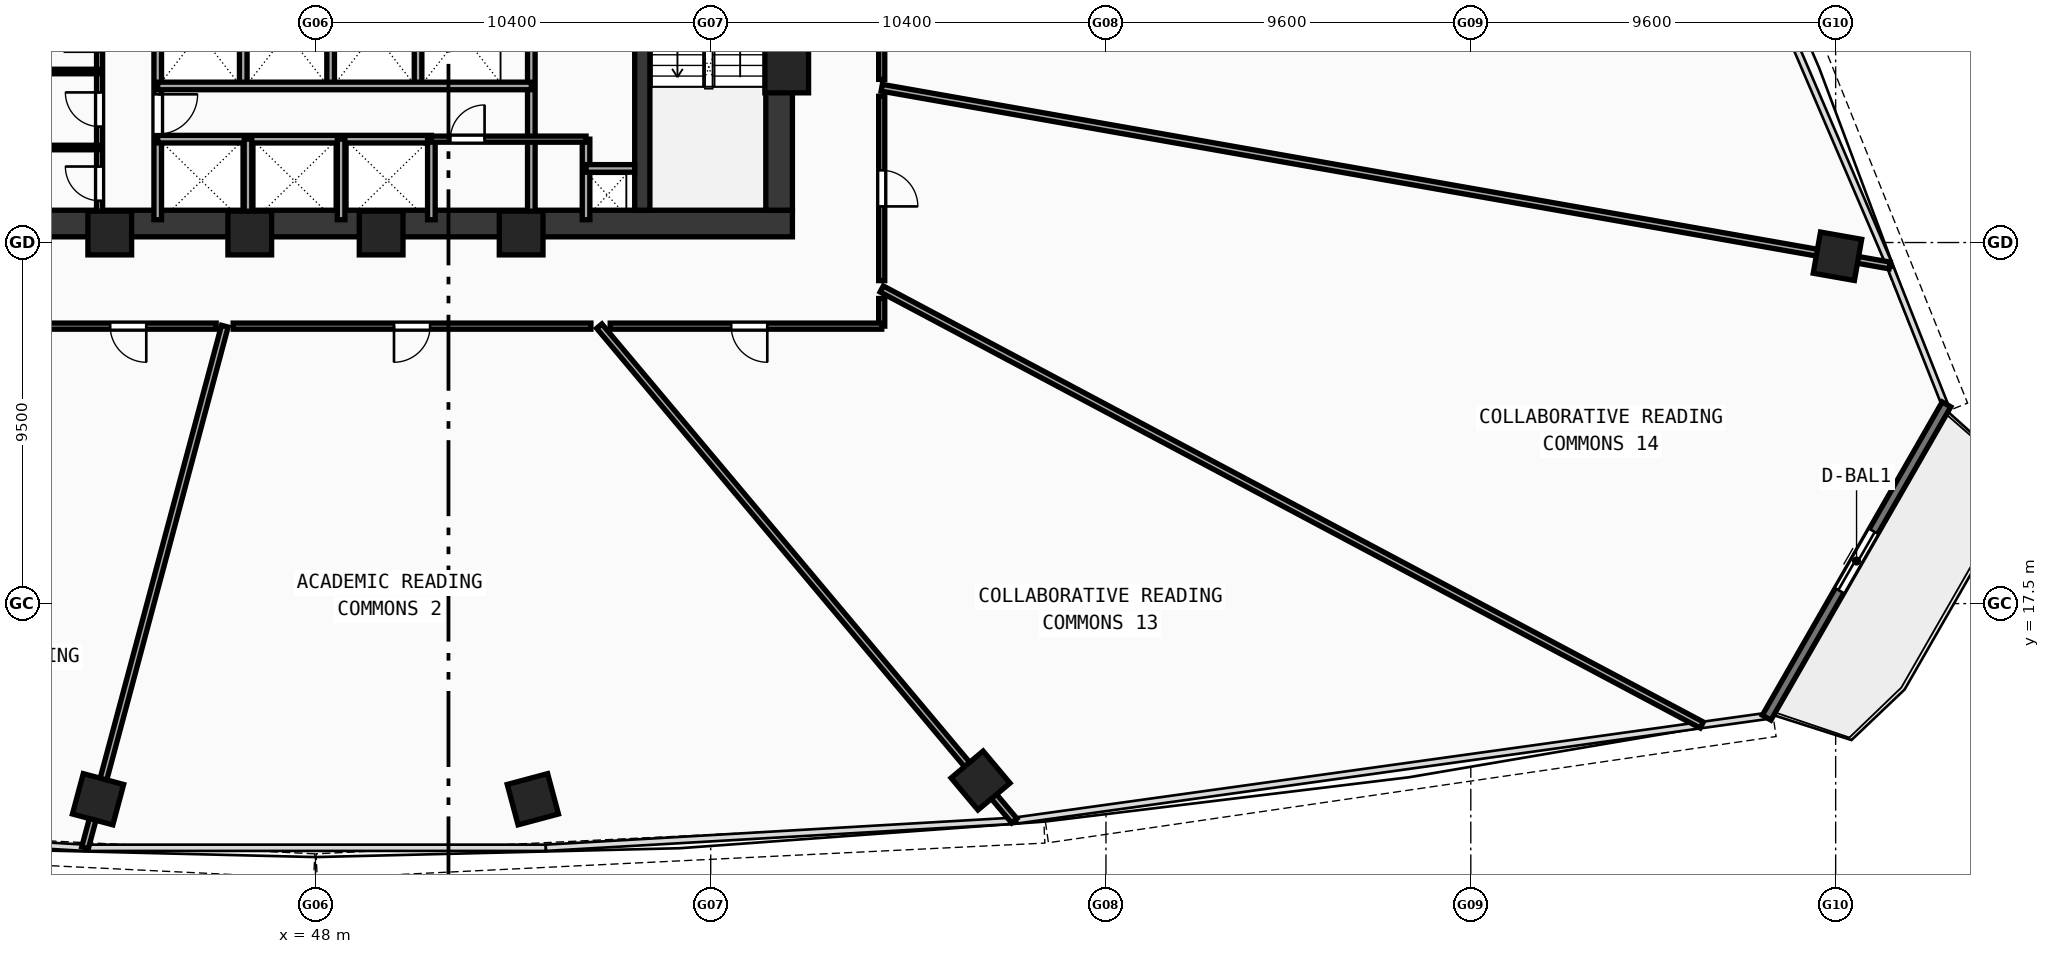
"""IFC4 building model, lengths in metres.
Left out: names, types, materials, properties, quantities, classifications, styles, units other than length and angle.
Written with IfcOpenShell. Run it as: python <this file> out.ifc"""

import sys

from ifc_helpers import new_model, si_unit, direction, frame, frame_2d, origin, origin_with_axes, origin_2d, place, context, subcontext, project, spatial, rectangle, hollow_rectangle, extrude, source, transform, mapped, element, fill, save


model = new_model("IFC4")
c1 = context("Model", 3, precision=1e-05, world=origin(), true_north=direction((0.0, 1.0)))
c2 = subcontext(c1, "Body", "Model", "MODEL_VIEW")
j1 = project(units=[si_unit("LENGTHUNIT", "METRE"), si_unit("PLANEANGLEUNIT", "RADIAN")], contexts=[c1])
p1 = place(None, origin())
s1 = spatial("IfcSite", under=j1, at=p1, CompositionType="ELEMENT")
p2 = place(p1, origin())
s2 = spatial("IfcBuilding", under=s1, at=p2, CompositionType="ELEMENT")
p3 = place(p2, frame((0.0, 0.0, 52.18)))
s3 = spatial("IfcBuildingStorey", under=s2, at=p3, CompositionType="ELEMENT", Elevation=52.18)
p4 = place(p3, frame((35.45, 27.5, 0.0), z_axis=(0.0, 0.0, 1.0), x_axis=(1.0, 0.0, 0.0)))
e1 = element("IfcWall", 1, at=p4, inside=s3, PredefinedType="SHEAR", context=c2, shape_type="SweptSolid", body=[
    extrude(rectangle(XDim=25.1, YDim=0.7, at=frame_2d((12.55, 0.0))), origin(), (0.0, 0.0, 1.0), 3.37),
])
p5 = place(p3, frame((60.2, 27.85, 0.0), z_axis=(0.0, 0.0, 1.0), x_axis=(0.0, 1.0, 0.0)))
e2 = element("IfcWall", 2, at=p5, inside=s3, PredefinedType="SHEAR", context=c2, shape_type="SweptSolid", body=[
    extrude(rectangle(XDim=12.0, YDim=0.7, at=frame_2d((6.0, 0.0))), origin(), (0.0, 0.0, 1.0), 3.37),
])
p6 = place(p3, frame((56.6, 27.85, 0.0), z_axis=(0.0, 0.0, 1.0), x_axis=(0.0, 1.0, 0.0)))
e3 = element("IfcWall", 3, at=p6, inside=s3, PredefinedType="SHEAR", context=c2, shape_type="SweptSolid", body=[
    extrude(rectangle(XDim=12.0, YDim=0.4, at=frame_2d((6.0, 0.0))), origin(), (0.0, 0.0, 1.0), 3.37),
])
p7 = place(p6, frame((9.9, 0.0, 0.0)))
e4 = element("IfcOpeningElement", 4, at=p7, cuts=e3, PredefinedType="OPENING", context=c2, shape_type="SweptSolid", body=[
    extrude(rectangle(XDim=1.1, YDim=2.1, at=frame_2d((0.55, 1.05))), frame((0.0, 0.21, 0.0), z_axis=(0.0, -1.0, 0.0), x_axis=(1.0, 0.0, 0.0)), (0.0, 0.0, 1.0), 0.42),
])
m1 = source(origin(), c2, "Body", "SweptSolid", [
    extrude(hollow_rectangle(XDim=1.15, YDim=1.15, WallThickness=0.048, at=origin_2d()), origin(), (0.0, 0.0, 1.0), 3.63),
])
for number, where, z_axis, x_axis in (
    (5, (42.588, 27.25, -0.26), (0.0, 0.0, 1.0), (1.0, 0.0, 0.0)),
    (6, (46.272, 27.25, -0.26), (0.0, 0.0, 1.0), (1.0, 0.0, 0.0)),
    (7, (49.729, 27.25, -0.26), (0.0, 0.0, 1.0), (1.0, 0.0, 0.0)),
    (8, (53.412, 27.25, -0.26), (0.0, 0.0, 1.0), (1.0, 0.0, 0.0)),
    (9, (60.4, 31.513, -0.26), (0.0, 0.0, 1.0), (1.0, 0.0, 0.0)),
):
    element("IfcColumn", number, at=place(p3, frame(where, z_axis=z_axis, x_axis=x_axis)), inside=s3, PredefinedType="COLUMN", context=c2, shape_type="MappedRepresentation", body=[
        mapped(m1, transform((0.0, 0.0, 0.0), scale=1.0)),
    ])
m2 = source(origin(), c2, "Body", "SweptSolid", [
    extrude(hollow_rectangle(XDim=1.1, YDim=1.1, WallThickness=0.045, at=origin_2d()), origin(), (0.0, 0.0, 1.0), 3.63),
])
for number, where, z_axis, x_axis in (
    (10, (42.28, 12.352, -0.26), (0.0, 0.0, 1.0), (0.966, -0.259, 0.0)),
    (11, (53.72, 12.352, -0.26), (0.0, 0.0, 1.0), (0.966, 0.259, 0.0)),
    (12, (65.5, 12.844, -0.26), (0.0, 0.0, 1.0), (0.766, 0.643, 0.0)),
    (13, (88.048, 26.638, -0.26), (0.0, 0.0, 1.0), (0.174, 0.985, 0.0)),
):
    element("IfcColumn", number, at=place(p3, frame(where, z_axis=z_axis, x_axis=x_axis)), inside=s3, PredefinedType="COLUMN", context=c2, shape_type="MappedRepresentation", body=[
        mapped(m2, transform((0.0, 0.0, 0.0), scale=1.0)),
    ])
p8 = place(p3, frame((86.184, 14.499, 0.0), z_axis=(0.0, 0.0, 1.0), x_axis=(0.497919395469, 0.86722331358, 0.0)))
e14 = element("IfcWall", 14, at=p8, inside=s3, PredefinedType="STANDARD", context=c2, shape_type="SweptSolid", body=[
    extrude(rectangle(XDim=9.504, YDim=0.26, at=frame_2d((4.752, 0.0))), origin(), (0.0, 0.0, 1.0), 3.37),
])
p9 = place(p8, frame((3.852, 0.0, 0.0)))
e15 = element("IfcOpeningElement", 15, at=p9, cuts=e14, PredefinedType="OPENING", context=c2, shape_type="SweptSolid", body=[
    extrude(rectangle(XDim=1.8, YDim=2.15, at=frame_2d((0.9, 1.075))), frame((0.0, 0.14, 0.0), z_axis=(0.0, -1.0, 0.0), x_axis=(1.0, 0.0, 0.0)), (0.0, 0.0, 1.0), 0.28),
])
p10 = place(p3, frame((43.85, 27.6, 0.0), z_axis=(0.0, 0.0, 1.0), x_axis=(0.0, 1.0, 0.0)))
e16 = element("IfcWall", 16, at=p10, inside=s3, PredefinedType="SOLIDWALL", context=c2, shape_type="SweptSolid", body=[
    extrude(rectangle(XDim=6.22, YDim=0.2, at=frame_2d((3.11, 0.0))), origin(), (0.0, 0.0, 1.0), 3.37),
])
p11 = place(p10, frame((2.25, 0.0, 0.0)))
e17 = element("IfcOpeningElement", 17, at=p11, cuts=e16, PredefinedType="OPENING", context=c2, shape_type="SweptSolid", body=[
    extrude(rectangle(XDim=1.05, YDim=2.1, at=frame_2d((0.525, 1.05))), frame((0.0, 0.11, 0.0), z_axis=(0.0, -1.0, 0.0), x_axis=(1.0, 0.0, 0.0)), (0.0, 0.0, 1.0), 0.22),
])
p12 = place(p3, frame((53.68, 27.6, 0.0), z_axis=(0.0, 0.0, 1.0), x_axis=(0.0, 1.0, 0.0)))
e18 = element("IfcWall", 18, at=p12, inside=s3, PredefinedType="SOLIDWALL", context=c2, shape_type="SweptSolid", body=[
    extrude(rectangle(XDim=9.05, YDim=0.2, at=frame_2d((4.525, 0.0))), origin(), (0.0, 0.0, 1.0), 3.37),
])
p13 = place(p12, frame((6.9, 0.0, 0.0)))
e19 = element("IfcOpeningElement", 19, at=p13, cuts=e18, PredefinedType="OPENING", context=c2, shape_type="SweptSolid", body=[
    extrude(rectangle(XDim=1.05, YDim=2.1, at=frame_2d((0.525, 1.05))), frame((0.0, 0.11, 0.0), z_axis=(0.0, -1.0, 0.0), x_axis=(1.0, 0.0, 0.0)), (0.0, 0.0, 1.0), 0.22),
])
for number, where, z_axis, x_axis in (
    (20, (46.1, 31.12, 0.0), (0.0, 0.0, 1.0), (0.0, 1.0, 0.0)),
    (21, (48.4, 31.12, 0.0), (0.0, 0.0, 1.0), (0.0, 1.0, 0.0)),
    (22, (50.7, 31.12, 0.0), (0.0, 0.0, 1.0), (0.0, 1.0, 0.0)),
):
    element("IfcWall", number, at=place(p3, frame(where, z_axis=z_axis, x_axis=x_axis)), inside=s3, PredefinedType="SOLIDWALL", context=c2, shape_type="SweptSolid", body=[
        extrude(rectangle(XDim=2.7, YDim=0.2, at=frame_2d((1.35, 0.0))), origin(), (0.0, 0.0, 1.0), 3.37),
    ])
p14 = place(p3, frame((43.85, 29.72, 0.0), z_axis=(0.0, 0.0, 1.0), x_axis=(1.0, 0.0, 0.0)))
e23 = element("IfcWall", 23, at=p14, inside=s3, PredefinedType="SOLIDWALL", context=c2, shape_type="SweptSolid", body=[
    extrude(rectangle(XDim=7.2, YDim=0.2, at=frame_2d((3.6, 0.0))), origin(), (0.0, 0.0, 1.0), 3.37),
])
p15 = place(p3, frame((51.05, 27.6, 0.0), z_axis=(0.0, 0.0, 1.0), x_axis=(0.0, 1.0, 0.0)))
e24 = element("IfcWall", 24, at=p15, inside=s3, PredefinedType="SOLIDWALL", context=c2, shape_type="SweptSolid", body=[
    extrude(rectangle(XDim=2.12, YDim=0.2, at=frame_2d((1.06, 0.0))), origin(), (0.0, 0.0, 1.0), 3.37),
])
p16 = place(p3, frame((43.85, 31.12, 0.0), z_axis=(0.0, 0.0, 1.0), x_axis=(1.0, 0.0, 0.0)))
e25 = element("IfcWall", 25, at=p16, inside=s3, PredefinedType="SOLIDWALL", context=c2, shape_type="SweptSolid", body=[
    extrude(rectangle(XDim=9.83, YDim=0.2, at=frame_2d((4.915, 0.0))), origin(), (0.0, 0.0, 1.0), 3.37),
])
for number, where, z_axis, x_axis in (
    (26, (46.225, 27.6, 0.0), (0.0, 0.0, 1.0), (0.0, 1.0, 0.0)),
    (27, (48.675, 27.6, 0.0), (0.0, 0.0, 1.0), (0.0, 1.0, 0.0)),
    (28, (55.12, 27.6, 0.0), (0.0, 0.0, 1.0), (0.0, 1.0, 0.0)),
):
    element("IfcWall", number, at=place(p3, frame(where, z_axis=z_axis, x_axis=x_axis)), inside=s3, PredefinedType="SOLIDWALL", context=c2, shape_type="SweptSolid", body=[
        extrude(rectangle(XDim=2.12, YDim=0.2, at=frame_2d((1.06, 0.0))), origin(), (0.0, 0.0, 1.0), 3.37),
    ])
p17 = place(p3, frame((55.12, 28.95, 0.0), z_axis=(0.0, 0.0, 1.0), x_axis=(1.0, 0.0, 0.0)))
e29 = element("IfcWall", 29, at=p17, inside=s3, PredefinedType="SOLIDWALL", context=c2, shape_type="SweptSolid", body=[
    extrude(rectangle(XDim=1.28, YDim=0.2, at=frame_2d((0.64, 0.0))), origin(), (0.0, 0.0, 1.0), 3.37),
])
p18 = place(p3, frame((42.32, 27.6, 0.0), z_axis=(0.0, 0.0, 1.0), x_axis=(0.0, 1.0, 0.0)))
e30 = element("IfcWall", 30, at=p18, inside=s3, PredefinedType="PARTITIONING", context=c2, shape_type="SweptSolid", body=[
    extrude(rectangle(XDim=5.9, YDim=0.16, at=frame_2d((2.95, 0.0))), origin(), (0.0, 0.0, 1.0), 3.37),
])
p19 = place(p18, frame((0.5, 0.0, 0.0)))
e31 = element("IfcOpeningElement", 31, at=p19, cuts=e30, PredefinedType="OPENING", context=c2, shape_type="SweptSolid", body=[
    extrude(rectangle(XDim=0.9, YDim=2.1, at=frame_2d((0.45, 1.05))), frame((0.0, 0.09, 0.0), z_axis=(0.0, -1.0, 0.0), x_axis=(1.0, 0.0, 0.0)), (0.0, 0.0, 1.0), 0.18),
])
p20 = place(p18, frame((2.45, 0.0, 0.0)))
e32 = element("IfcOpeningElement", 32, at=p20, cuts=e30, PredefinedType="OPENING", context=c2, shape_type="SweptSolid", body=[
    extrude(rectangle(XDim=0.9, YDim=2.1, at=frame_2d((0.45, 1.05))), frame((0.0, 0.09, 0.0), z_axis=(0.0, -1.0, 0.0), x_axis=(1.0, 0.0, 0.0)), (0.0, 0.0, 1.0), 0.18),
])
p21 = place(p18, frame((4.42, 0.0, 0.0)))
e33 = element("IfcOpeningElement", 33, at=p21, cuts=e30, PredefinedType="OPENING", context=c2, shape_type="SweptSolid", body=[
    extrude(rectangle(XDim=0.94, YDim=2.1, at=frame_2d((0.47, 1.05))), frame((0.0, 0.09, 0.0), z_axis=(0.0, -1.0, 0.0), x_axis=(1.0, 0.0, 0.0)), (0.0, 0.0, 1.0), 0.18),
])
p22 = place(p3, frame((51.05, 29.72, 0.0), z_axis=(0.0, 0.0, 1.0), x_axis=(1.0, 0.0, 0.0)))
e34 = element("IfcWall", 34, at=p22, inside=s3, PredefinedType="PARTITIONING", context=c2, shape_type="SweptSolid", body=[
    extrude(rectangle(XDim=4.07, YDim=0.16, at=frame_2d((2.035, 0.0))), origin(), (0.0, 0.0, 1.0), 3.37),
])
p23 = place(p22, frame((0.5, 0.0, 0.0)))
e35 = element("IfcOpeningElement", 35, at=p23, cuts=e34, PredefinedType="OPENING", context=c2, shape_type="SweptSolid", body=[
    extrude(rectangle(XDim=0.9, YDim=2.1, at=frame_2d((0.45, 1.05))), frame((0.0, 0.09, 0.0), z_axis=(0.0, -1.0, 0.0), x_axis=(1.0, 0.0, 0.0)), (0.0, 0.0, 1.0), 0.18),
])
for number, where, z_axis, x_axis in (
    (36, (39.6, 29.5, 0.0), (0.0, 0.0, 1.0), (1.0, 0.0, 0.0)),
    (37, (39.6, 31.5, 0.0), (0.0, 0.0, 1.0), (1.0, 0.0, 0.0)),
):
    element("IfcWall", number, at=place(p3, frame(where, z_axis=z_axis, x_axis=x_axis)), inside=s3, PredefinedType="PARTITIONING", context=c2, shape_type="SweptSolid", body=[
        extrude(rectangle(XDim=2.72, YDim=0.12, at=frame_2d((1.36, 0.0))), origin(), (0.0, 0.0, 1.0), 3.37),
    ])
p24 = place(p3, frame((45.615, 24.8, 0.0), z_axis=(0.0, 0.0, 1.0), x_axis=(-0.258821679731, -0.965925120339, 0.0)))
e38 = element("IfcWall", 38, at=p24, inside=s3, PredefinedType="PARTITIONING", context=c2, shape_type="SweptSolid", body=[
    extrude(rectangle(XDim=14.209, YDim=0.18, at=frame_2d((7.105, 0.0))), origin(), (0.0, 0.0, 1.0), 2.67),
])
p25 = place(p3, frame((55.468, 24.8, 0.0), z_axis=(0.0, 0.0, 1.0), x_axis=(0.642791593325, -0.766041100432, 0.0)))
e39 = element("IfcWall", 39, at=p25, inside=s3, PredefinedType="PARTITIONING", context=c2, shape_type="SweptSolid", body=[
    extrude(rectangle(XDim=16.988, YDim=0.18, at=frame_2d((8.494, 0.0))), origin(), (0.0, 0.0, 1.0), 2.67),
])
p26 = place(p3, frame((62.9, 25.778, 0.0), z_axis=(0.0, 0.0, 1.0), x_axis=(0.882949316257, -0.469468321531, 0.0)))
e40 = element("IfcWall", 40, at=p26, inside=s3, PredefinedType="PARTITIONING", context=c2, shape_type="SweptSolid", body=[
    extrude(rectangle(XDim=24.437, YDim=0.18, at=frame_2d((12.219, 0.0))), origin(), (0.0, 0.0, 1.0), 2.67),
])
p27 = place(p3, frame((62.9, 31.073, 0.0), z_axis=(0.0, 0.0, 1.0), x_axis=(0.984808099647, -0.173646211791, 0.0)))
e41 = element("IfcWall", 41, at=p27, inside=s3, PredefinedType="PARTITIONING", context=c2, shape_type="SweptSolid", body=[
    extrude(rectangle(XDim=26.93, YDim=0.18, at=frame_2d((13.465, 0.0))), origin(), (0.0, 0.0, 1.0), 2.67),
])
p28 = place(p3, frame((62.9, 38.322, 0.0), z_axis=(0.0, 0.0, 1.0), x_axis=(0.0, -1.0, 0.0)))
e42 = element("IfcWall", 42, at=p28, inside=s3, PredefinedType="PARTITIONING", context=c2, shape_type="SweptSolid", body=[
    extrude(rectangle(XDim=7.029, YDim=0.16, at=frame_2d((3.515, 0.0))), origin(), (0.0, 0.0, 1.0), 3.37),
])
p29 = place(p28, frame((3.054, 0.0, 0.0)))
e43 = element("IfcOpeningElement", 43, at=p29, cuts=e42, PredefinedType="OPENING", context=c2, shape_type="SweptSolid", body=[
    extrude(rectangle(XDim=0.92, YDim=2.1, at=frame_2d((0.46, 1.05))), frame((0.0, 0.09, 0.0), z_axis=(0.0, -1.0, 0.0), x_axis=(1.0, 0.0, 0.0)), (0.0, 0.0, 1.0), 0.18),
])
p30 = place(p3, frame((62.9, 30.849, 0.0), z_axis=(0.0, 0.0, 1.0), x_axis=(0.0, -1.0, 0.0)))
e44 = element("IfcWall", 44, at=p30, inside=s3, PredefinedType="PARTITIONING", context=c2, shape_type="SweptSolid", body=[
    extrude(rectangle(XDim=4.852, YDim=0.16, at=frame_2d((2.426, 0.0))), origin(), (0.0, 0.0, 1.0), 3.37),
])
p31 = place(p30, frame((1.949, 0.0, 0.0)))
e45 = element("IfcOpeningElement", 45, at=p31, cuts=e44, PredefinedType="OPENING", context=c2, shape_type="SweptSolid", body=[
    extrude(rectangle(XDim=0.95, YDim=2.1, at=frame_2d((0.475, 1.05))), frame((0.0, 0.09, 0.0), z_axis=(0.0, -1.0, 0.0), x_axis=(1.0, 0.0, 0.0)), (0.0, 0.0, 1.0), 0.18),
])
p32 = place(p3, frame((62.9, 25.528, 0.0), z_axis=(0.0, 0.0, 1.0), x_axis=(0.0, -1.0, 0.0)))
e46 = element("IfcWall", 46, at=p32, inside=s3, PredefinedType="PARTITIONING", context=c2, shape_type="SweptSolid", body=[
    extrude(rectangle(XDim=0.728, YDim=0.16, at=frame_2d((0.364, 0.0))), origin(), (0.0, 0.0, 1.0), 2.97),
])
p33 = place(p3, frame((62.9, 24.8, 0.0), z_axis=(0.0, 0.0, 1.0), x_axis=(-1.0, 0.0, 0.0)))
e47 = element("IfcWall", 47, at=p33, inside=s3, PredefinedType="PARTITIONING", context=c2, shape_type="SweptSolid", body=[
    extrude(rectangle(XDim=7.145, YDim=0.16, at=frame_2d((3.572, 0.0))), origin(), (0.0, 0.0, 1.0), 2.97),
])
p34 = place(p33, frame((3.011, 0.0, 0.0)))
e48 = element("IfcOpeningElement", 48, at=p34, cuts=e47, PredefinedType="OPENING", context=c2, shape_type="SweptSolid", body=[
    extrude(rectangle(XDim=0.95, YDim=2.1, at=frame_2d((0.475, 1.05))), frame((0.0, 0.09, 0.0), z_axis=(0.0, -1.0, 0.0), x_axis=(1.0, 0.0, 0.0)), (0.0, 0.0, 1.0), 0.18),
])
p35 = place(p3, frame((55.248, 24.8, 0.0), z_axis=(0.0, 0.0, 1.0), x_axis=(-1.0, 0.0, 0.0)))
e49 = element("IfcWall", 49, at=p35, inside=s3, PredefinedType="PARTITIONING", context=c2, shape_type="SweptSolid", body=[
    extrude(rectangle(XDim=9.413, YDim=0.16, at=frame_2d((4.707, 0.0))), origin(), (0.0, 0.0, 1.0), 2.67),
])
p36 = place(p35, frame((4.231, 0.0, 0.0)))
e50 = element("IfcOpeningElement", 50, at=p36, cuts=e49, PredefinedType="OPENING", context=c2, shape_type="SweptSolid", body=[
    extrude(rectangle(XDim=0.95, YDim=2.1, at=frame_2d((0.475, 1.05))), frame((0.0, 0.09, 0.0), z_axis=(0.0, -1.0, 0.0), x_axis=(1.0, 0.0, 0.0)), (0.0, 0.0, 1.0), 0.18),
])
p37 = place(p3, frame((45.387, 24.8, 0.0), z_axis=(0.0, 0.0, 1.0), x_axis=(-1.0, 0.0, 0.0)))
e51 = element("IfcWall", 51, at=p37, inside=s3, PredefinedType="PARTITIONING", context=c2, shape_type="SweptSolid", body=[
    extrude(rectangle(XDim=4.635, YDim=0.16, at=frame_2d((2.318, 0.0))), origin(), (0.0, 0.0, 1.0), 2.67),
])
p38 = place(p37, frame((1.839, 0.0, 0.0)))
e52 = element("IfcOpeningElement", 52, at=p38, cuts=e51, PredefinedType="OPENING", context=c2, shape_type="SweptSolid", body=[
    extrude(rectangle(XDim=0.95, YDim=2.1, at=frame_2d((0.475, 1.05))), frame((0.0, 0.09, 0.0), z_axis=(0.0, -1.0, 0.0), x_axis=(1.0, 0.0, 0.0)), (0.0, 0.0, 1.0), 0.18),
])
m3 = source(origin(), c2, "Body", "SweptSolid", [
    extrude(rectangle(XDim=1.8, YDim=2.15, at=frame_2d((0.9, 1.075))), frame((0.0, 0.025, 0.0), z_axis=(0.0, -1.0, 0.0), x_axis=(1.0, 0.0, 0.0)), (0.0, 0.0, 1.0), 0.05),
])
p39 = place(p9, origin_with_axes())
e53 = element("IfcDoor", 53, at=p39, inside=s3, OperationType="DOUBLE_DOOR_SLIDING", PredefinedType="DOOR", context=c2, shape_type="MappedRepresentation", body=[
    mapped(m3, transform((0.0, 0.0, 0.0), scale=1.0)),
])
fill(e15, e53)
m4 = source(origin(), c2, "Body", "SweptSolid", [
    extrude(rectangle(XDim=1.05, YDim=2.1, at=frame_2d((0.525, 1.05))), frame((0.0, 0.025, 0.0), z_axis=(0.0, -1.0, 0.0), x_axis=(1.0, 0.0, 0.0)), (0.0, 0.0, 1.0), 0.05),
])
p40 = place(p11, frame((1.05, 0.0, 0.0), z_axis=(0.0, 0.0, 1.0), x_axis=(-1.0, 0.0, 0.0)))
e54 = element("IfcDoor", 54, at=p40, inside=s3, OperationType="SINGLE_SWING_LEFT", PredefinedType="DOOR", context=c2, shape_type="MappedRepresentation", body=[
    mapped(m4, transform((0.0, 0.0, 0.0), scale=1.0)),
])
fill(e17, e54)
m5 = source(origin(), c2, "Body", "SweptSolid", [
    extrude(rectangle(XDim=0.9, YDim=2.1, at=frame_2d((0.45, 1.05))), frame((0.0, 0.025, 0.0), z_axis=(0.0, -1.0, 0.0), x_axis=(1.0, 0.0, 0.0)), (0.0, 0.0, 1.0), 0.05),
])
p41 = place(p19, origin_with_axes())
e55 = element("IfcDoor", 55, at=p41, inside=s3, OperationType="SINGLE_SWING_RIGHT", PredefinedType="DOOR", context=c2, shape_type="MappedRepresentation", body=[
    mapped(m5, transform((0.0, 0.0, 0.0), scale=1.0)),
])
fill(e31, e55)
p42 = place(p20, origin_with_axes())
e56 = element("IfcDoor", 56, at=p42, inside=s3, OperationType="SINGLE_SWING_RIGHT", PredefinedType="DOOR", context=c2, shape_type="MappedRepresentation", body=[
    mapped(m5, transform((0.0, 0.0, 0.0), scale=1.0)),
])
fill(e32, e56)
p43 = place(p23, origin_with_axes())
e57 = element("IfcDoor", 57, at=p43, inside=s3, OperationType="SINGLE_SWING_RIGHT", PredefinedType="DOOR", context=c2, shape_type="MappedRepresentation", body=[
    mapped(m5, transform((0.0, 0.0, 0.0), scale=1.0)),
])
fill(e35, e57)
m6 = source(origin(), c2, "Body", "SweptSolid", [
    extrude(rectangle(XDim=0.95, YDim=2.1, at=frame_2d((0.475, 1.05))), frame((0.0, 0.025, 0.0), z_axis=(0.0, -1.0, 0.0), x_axis=(1.0, 0.0, 0.0)), (0.0, 0.0, 1.0), 0.05),
])
p44 = place(p38, origin_with_axes())
e58 = element("IfcDoor", 58, at=p44, inside=s3, OperationType="SINGLE_SWING_LEFT", PredefinedType="DOOR", context=c2, shape_type="MappedRepresentation", body=[
    mapped(m6, transform((0.0, 0.0, 0.0), scale=1.0)),
])
fill(e52, e58)
p45 = place(p36, origin_with_axes())
e59 = element("IfcDoor", 59, at=p45, inside=s3, OperationType="SINGLE_SWING_RIGHT", PredefinedType="DOOR", context=c2, shape_type="MappedRepresentation", body=[
    mapped(m6, transform((0.0, 0.0, 0.0), scale=1.0)),
])
fill(e50, e59)
p46 = place(p34, origin_with_axes())
e60 = element("IfcDoor", 60, at=p46, inside=s3, OperationType="SINGLE_SWING_LEFT", PredefinedType="DOOR", context=c2, shape_type="MappedRepresentation", body=[
    mapped(m6, transform((0.0, 0.0, 0.0), scale=1.0)),
])
fill(e48, e60)
p47 = place(p31, origin_with_axes())
e61 = element("IfcDoor", 61, at=p47, inside=s3, OperationType="SINGLE_SWING_RIGHT", PredefinedType="DOOR", context=c2, shape_type="MappedRepresentation", body=[
    mapped(m6, transform((0.0, 0.0, 0.0), scale=1.0)),
])
fill(e45, e61)
save(model, sys.argv[1])
